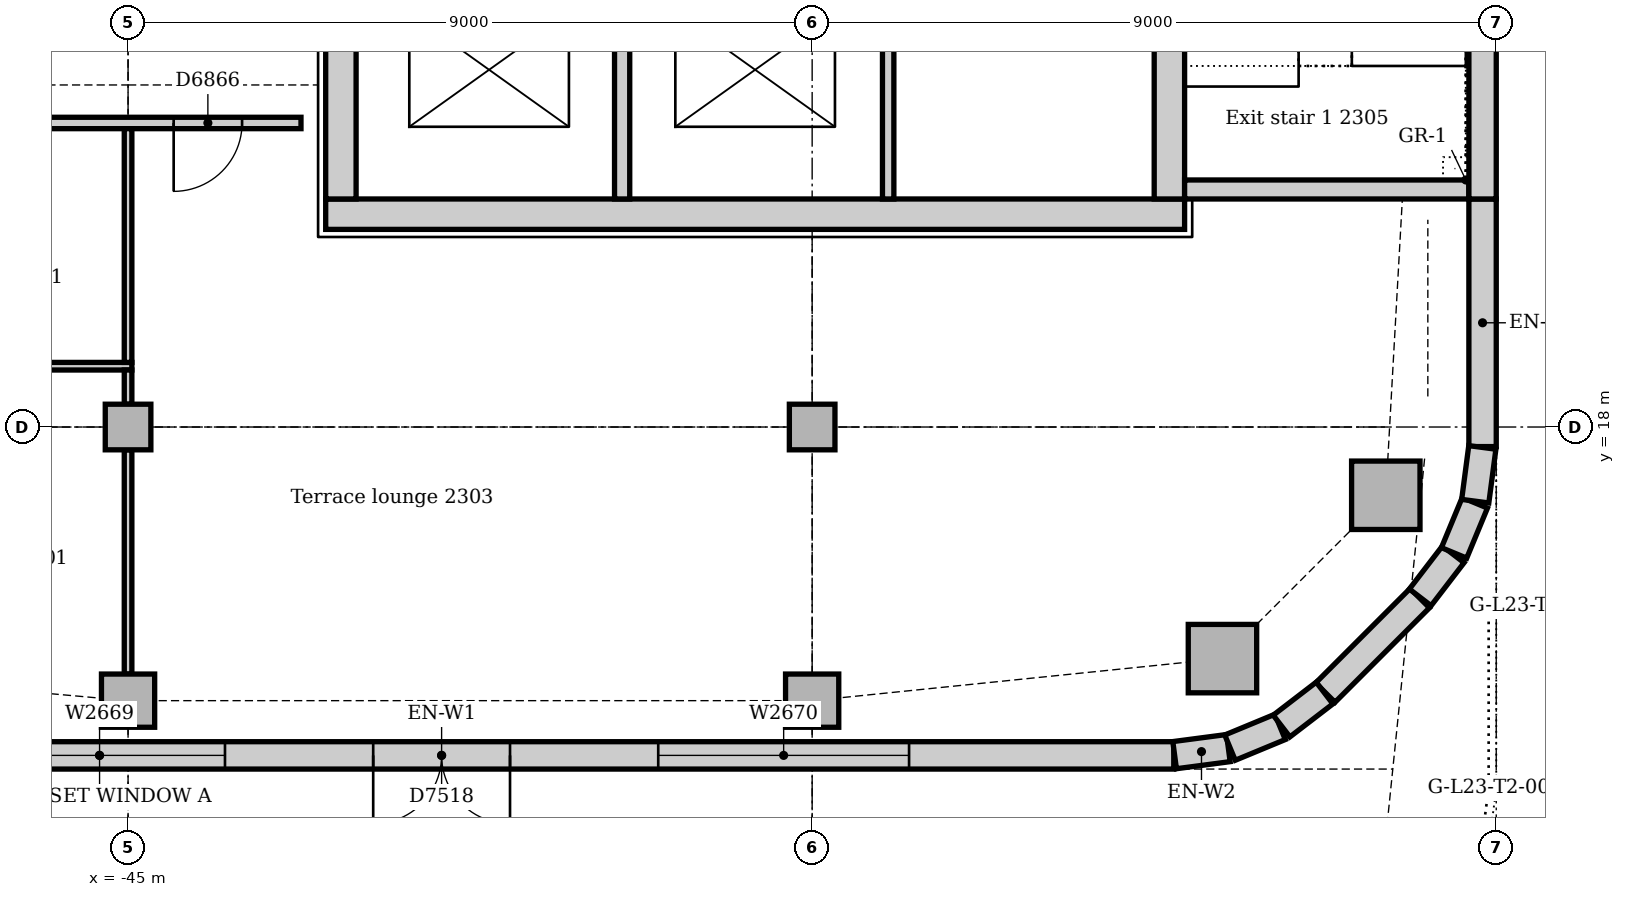
"""IFC4 building model, lengths in metres.
Left out: names, types, materials, properties, quantities, classifications, styles, units other than length and angle.
Written with IfcOpenShell. Run it as: python <this file> out.ifc"""

import sys

from ifc_helpers import new_model, si_unit, direction, frame, frame_2d, origin, origin_2d, place, context, subcontext, project, spatial, rectangle, extrude, element, fill, save


model = new_model("IFC4")
c1 = context("Model", 3, precision=1e-05, world=origin(), true_north=direction((0.0, 1.0)))
c2 = subcontext(c1, "Body", "Model", "MODEL_VIEW")
j1 = project(units=[si_unit("LENGTHUNIT", "METRE"), si_unit("PLANEANGLEUNIT", "RADIAN")], contexts=[c1])
p1 = place(None, origin())
s1 = spatial("IfcSite", under=j1, at=p1, CompositionType="ELEMENT")
p2 = place(p1, origin())
s2 = spatial("IfcBuilding", under=s1, at=p2, CompositionType="ELEMENT")
p3 = place(p2, frame((0.0, 0.0, 100.0)))
s3 = spatial("IfcBuildingStorey", under=s2, at=p3, CompositionType="ELEMENT", Elevation=100.0)
p4 = place(p3, frame((-42.4, 20.8, 0.0), z_axis=(0.0, 0.0, 1.0), x_axis=(1.0, 0.0, 0.0)))
e1 = element("IfcWall", 1, at=p4, inside=s3, PredefinedType="SOLIDWALL", context=c2, shape_type="SweptSolid", body=[
    extrude(rectangle(XDim=11.3, YDim=0.4, at=frame_2d((5.65, 0.0))), origin(), (0.0, 0.0, 1.0), 4.0),
])
p5 = place(p3, frame((-31.3, 21.0, 0.0), z_axis=(0.0, 0.0, 1.0), x_axis=(0.0, 1.0, 0.0)))
e2 = element("IfcWall", 2, at=p5, inside=s3, PredefinedType="SOLIDWALL", context=c2, shape_type="SweptSolid", body=[
    extrude(rectangle(XDim=9.5, YDim=0.4, at=frame_2d((4.75, 0.0))), origin(), (0.0, 0.0, 1.0), 4.0),
])
p6 = place(p5, frame((5.25, 0.0, 0.0)))
e3 = element("IfcOpeningElement", 3, at=p6, cuts=e2, PredefinedType="OPENING", context=c2, shape_type="SweptSolid", body=[
    extrude(rectangle(XDim=1.0, YDim=2.1, at=frame_2d((0.5, 1.05))), frame((0.0, 0.21, 0.0), z_axis=(0.0, -1.0, 0.0), x_axis=(1.0, 0.0, 0.0)), (0.0, 0.0, 1.0), 0.42),
])
p7 = place(p3, frame((-42.2, 30.5, 0.0), z_axis=(0.0, 0.0, 1.0), x_axis=(0.0, -1.0, 0.0)))
e4 = element("IfcWall", 4, at=p7, inside=s3, PredefinedType="SOLIDWALL", context=c2, shape_type="SweptSolid", body=[
    extrude(rectangle(XDim=9.5, YDim=0.4, at=frame_2d((4.75, 0.0))), origin(), (0.0, 0.0, 1.0), 4.0),
])
p8 = place(p7, frame((3.85, 0.0, 0.0)))
e5 = element("IfcOpeningElement", 5, at=p8, cuts=e4, PredefinedType="OPENING", context=c2, shape_type="SweptSolid", body=[
    extrude(rectangle(XDim=1.8, YDim=2.1, at=frame_2d((0.9, 1.05))), frame((0.0, 0.21, 0.0), z_axis=(0.0, -1.0, 0.0), x_axis=(1.0, 0.0, 0.0)), (0.0, 0.0, 1.0), 0.42),
])
p9 = place(p3, frame((-31.1, 21.125, 0.0), z_axis=(0.0, 0.0, 1.0), x_axis=(1.0, 0.0, 0.0)))
e6 = element("IfcWall", 6, at=p9, inside=s3, PredefinedType="SOLIDWALL", context=c2, shape_type="SweptSolid", body=[
    extrude(rectangle(XDim=3.74, YDim=0.25, at=frame_2d((1.87, 0.0))), origin(), (0.0, 0.0, 1.0), 4.0),
])
for number, where, z_axis, x_axis in (
    (7, (-30.602, 14.953, -0.15), (0.0, 0.0, 1.0), (1.0, 0.0, 0.0)),
    (8, (-28.453, 17.102, -0.15), (0.0, 0.0, 1.0), (1.0, 0.0, 0.0)),
):
    element("IfcColumn", number, at=place(p3, frame(where, z_axis=z_axis, x_axis=x_axis)), inside=s3, PredefinedType="COLUMN", context=c2, shape_type="SweptSolid", body=[
        extrude(rectangle(XDim=0.9, YDim=0.9, at=origin_2d()), origin(), (0.0, 0.0, 1.0), 4.0),
    ])
for number, where, z_axis, x_axis in (
    (9, (-45.0, 14.4, -0.15), (0.0, 0.0, 1.0), (1.0, 0.0, 0.0)),
    (10, (-36.0, 14.4, -0.15), (0.0, 0.0, 1.0), (1.0, 0.0, 0.0)),
):
    element("IfcColumn", number, at=place(p3, frame(where, z_axis=z_axis, x_axis=x_axis)), inside=s3, PredefinedType="COLUMN", context=c2, shape_type="SweptSolid", body=[
        extrude(rectangle(XDim=0.7, YDim=0.7, at=origin_2d()), origin(), (0.0, 0.0, 1.0), 4.0),
    ])
for number, where, z_axis, x_axis in (
    (11, (-45.0, 18.0, 0.0), (0.0, 0.0, 1.0), (1.0, 0.0, 0.0)),
    (12, (-36.0, 18.0, 0.0), (0.0, 0.0, 1.0), (1.0, 0.0, 0.0)),
):
    element("IfcColumn", number, at=place(p3, frame(where, z_axis=z_axis, x_axis=x_axis)), inside=s3, PredefinedType="COLUMN", context=c2, shape_type="SweptSolid", body=[
        extrude(rectangle(XDim=0.6, YDim=0.6, at=origin_2d()), origin(), (0.0, 0.0, 1.0), 3.85),
    ])
p10 = place(p3, frame((-50.507, 13.68, 0.0), z_axis=(0.0, 0.0, 1.0), x_axis=(1.0, 0.0, 0.0)))
e13 = element("IfcWall", 13, at=p10, inside=s3, PredefinedType="STANDARD", context=c2, shape_type="SweptSolid", body=[
    extrude(rectangle(XDim=19.265, YDim=0.36, at=frame_2d((9.632, 0.0))), origin(), (0.0, 0.0, 1.0), 3.85),
])
p11 = place(p10, frame((3.482, 0.0, 0.9)))
e14 = element("IfcOpeningElement", 14, at=p11, cuts=e13, PredefinedType="OPENING", context=c2, shape_type="SweptSolid", body=[
    extrude(rectangle(XDim=3.3, YDim=1.6, at=frame_2d((1.65, 0.8))), frame((0.0, 0.19, 0.0), z_axis=(0.0, -1.0, 0.0), x_axis=(1.0, 0.0, 0.0)), (0.0, 0.0, 1.0), 0.38),
])
p12 = place(p10, frame((8.732, 0.0, 0.0)))
e15 = element("IfcOpeningElement", 15, at=p12, cuts=e13, PredefinedType="OPENING", context=c2, shape_type="SweptSolid", body=[
    extrude(rectangle(XDim=1.8, YDim=2.4, at=frame_2d((0.9, 1.2))), frame((0.0, 0.19, 0.0), z_axis=(0.0, -1.0, 0.0), x_axis=(1.0, 0.0, 0.0)), (0.0, 0.0, 1.0), 0.38),
])
p13 = place(p10, frame((12.482, 0.0, 0.9)))
e16 = element("IfcOpeningElement", 16, at=p13, cuts=e13, PredefinedType="OPENING", context=c2, shape_type="SweptSolid", body=[
    extrude(rectangle(XDim=3.3, YDim=1.6, at=frame_2d((1.65, 0.8))), frame((0.0, 0.19, 0.0), z_axis=(0.0, -1.0, 0.0), x_axis=(1.0, 0.0, 0.0)), (0.0, 0.0, 1.0), 0.38),
])
p14 = place(p3, frame((-29.249, 14.506, 0.0), z_axis=(0.0, 0.0, 1.0), x_axis=(0.707106781187, 0.707106781187, 0.0)))
e17 = element("IfcWall", 17, at=p14, inside=s3, PredefinedType="STANDARD", context=c2, shape_type="SweptSolid", body=[
    extrude(rectangle(XDim=1.757, YDim=0.36, at=frame_2d((0.879, 0.0))), origin(), (0.0, 0.0, 1.0), 3.85),
])
p15 = place(p3, frame((-27.18, 17.743, 0.0), z_axis=(0.0, 0.0, 1.0), x_axis=(0.0, 1.0, 0.0)))
e18 = element("IfcWall", 18, at=p15, inside=s3, PredefinedType="STANDARD", context=c2, shape_type="SweptSolid", body=[
    extrude(rectangle(XDim=3.257, YDim=0.36, at=frame_2d((1.629, 0.0))), origin(), (0.0, 0.0, 1.0), 3.85),
])
p16 = place(p3, frame((-27.18, 21.0, 0.0), z_axis=(0.0, 0.0, 1.0), x_axis=(0.0, 1.0, 0.0)))
e19 = element("IfcWall", 19, at=p16, inside=s3, PredefinedType="STANDARD", context=c2, shape_type="SweptSolid", body=[
    extrude(rectangle(XDim=6.75, YDim=0.36, at=frame_2d((3.375, 0.0))), origin(), (0.0, 0.0, 1.0), 3.85),
])
for number, where, z_axis, x_axis in (
    (20, (-31.231, 13.683, 0.0), (0.0, 0.0, 1.0), (0.991, 0.131, 0.0)),
    (21, (-30.503, 13.782, 0.0), (0.0, 0.0, 1.0), (0.924, 0.383, 0.0)),
):
    element("IfcWall", number, at=place(p3, frame(where, z_axis=z_axis, x_axis=x_axis)), inside=s3, PredefinedType="STANDARD", context=c2, shape_type="SweptSolid", body=[
        extrude(rectangle(XDim=0.713, YDim=0.36, at=frame_2d((0.356, 0.0))), origin(), (0.0, 0.0, 1.0), 3.85),
    ])
for number, where, z_axis, x_axis in (
    (22, (-29.825, 14.066, 0.0), (0.0, 0.0, 1.0), (0.793, 0.609, 0.0)),
    (23, (-28.0, 15.759, 0.0), (0.0, 0.0, 1.0), (0.609, 0.793, 0.0)),
):
    element("IfcWall", number, at=place(p3, frame(where, z_axis=z_axis, x_axis=x_axis)), inside=s3, PredefinedType="STANDARD", context=c2, shape_type="SweptSolid", body=[
        extrude(rectangle(XDim=0.713, YDim=0.36, at=frame_2d((0.357, 0.0))), origin(), (0.0, 0.0, 1.0), 3.85),
    ])
for number, where, z_axis, x_axis in (
    (24, (-27.555, 16.344, 0.0), (0.0, 0.0, 1.0), (0.383, 0.924, 0.0)),
    (25, (-27.276, 17.024, 0.0), (0.0, 0.0, 1.0), (0.131, 0.991, 0.0)),
):
    element("IfcWall", number, at=place(p3, frame(where, z_axis=z_axis, x_axis=x_axis)), inside=s3, PredefinedType="STANDARD", context=c2, shape_type="SweptSolid", body=[
        extrude(rectangle(XDim=0.713, YDim=0.36, at=frame_2d((0.356, 0.0))), origin(), (0.0, 0.0, 1.0), 3.85),
    ])
p17 = place(p3, frame((-38.5, 21.0, 0.0), z_axis=(0.0, 0.0, 1.0), x_axis=(0.0, 1.0, 0.0)))
e26 = element("IfcWall", 26, at=p17, inside=s3, PredefinedType="SOLIDWALL", context=c2, shape_type="SweptSolid", body=[
    extrude(rectangle(XDim=3.1, YDim=0.2, at=frame_2d((1.55, 0.0))), origin(), (0.0, 0.0, 1.0), 4.0),
])
p18 = place(p3, frame((-35.0, 21.0, 0.0), z_axis=(0.0, 0.0, 1.0), x_axis=(0.0, 1.0, 0.0)))
e27 = element("IfcWall", 27, at=p18, inside=s3, PredefinedType="SOLIDWALL", context=c2, shape_type="SweptSolid", body=[
    extrude(rectangle(XDim=2.9, YDim=0.15, at=frame_2d((1.45, 0.0))), origin(), (0.0, 0.0, 1.0), 4.0),
])
p19 = place(p3, frame((-59.766, 22.0, 0.0), z_axis=(0.0, 0.0, 1.0), x_axis=(1.0, 0.0, 0.0)))
e28 = element("IfcWall", 28, at=p19, inside=s3, PredefinedType="PARTITIONING", context=c2, shape_type="SweptSolid", body=[
    extrude(rectangle(XDim=17.041, YDim=0.15, at=frame_2d((8.52, 0.0))), origin(), (0.0, 0.0, 1.0), 3.85),
])
p20 = place(p19, frame((15.366, 0.0, 0.0)))
e29 = element("IfcOpeningElement", 29, at=p20, cuts=e28, PredefinedType="OPENING", context=c2, shape_type="SweptSolid", body=[
    extrude(rectangle(XDim=0.9, YDim=2.1, at=frame_2d((0.45, 1.05))), frame((0.0, 0.085, 0.0), z_axis=(0.0, -1.0, 0.0), x_axis=(1.0, 0.0, 0.0)), (0.0, 0.0, 1.0), 0.17),
])
p21 = place(p19, frame((2.5, 0.0, 0.0)))
e30 = element("IfcOpeningElement", 30, at=p21, cuts=e28, PredefinedType="OPENING", context=c2, shape_type="SweptSolid", body=[
    extrude(rectangle(XDim=0.9, YDim=2.1, at=frame_2d((0.45, 1.05))), frame((0.0, 0.085, 0.0), z_axis=(0.0, -1.0, 0.0), x_axis=(1.0, 0.0, 0.0)), (0.0, 0.0, 1.0), 0.17),
])
p22 = place(p19, frame((9.056, 0.0, 0.0)))
e31 = element("IfcOpeningElement", 31, at=p22, cuts=e28, PredefinedType="OPENING", context=c2, shape_type="SweptSolid", body=[
    extrude(rectangle(XDim=1.0, YDim=2.1, at=frame_2d((0.5, 1.05))), frame((0.0, 0.085, 0.0), z_axis=(0.0, -1.0, 0.0), x_axis=(1.0, 0.0, 0.0)), (0.0, 0.0, 1.0), 0.17),
])
p23 = place(p3, frame((-54.05, 18.8, 0.0), z_axis=(0.0, 0.0, 1.0), x_axis=(1.0, 0.0, 0.0)))
e32 = element("IfcWall", 32, at=p23, inside=s3, PredefinedType="PARTITIONING", context=c2, shape_type="SweptSolid", body=[
    extrude(rectangle(XDim=9.1, YDim=0.1, at=frame_2d((4.55, 0.0))), origin(), (0.0, 0.0, 1.0), 3.85),
])
p24 = place(p23, frame((3.39, 0.0, 0.0)))
e33 = element("IfcOpeningElement", 33, at=p24, cuts=e32, PredefinedType="OPENING", context=c2, shape_type="SweptSolid", body=[
    extrude(rectangle(XDim=0.9, YDim=2.1, at=frame_2d((0.45, 1.05))), frame((0.0, 0.06, 0.0), z_axis=(0.0, -1.0, 0.0), x_axis=(1.0, 0.0, 0.0)), (0.0, 0.0, 1.0), 0.12),
])
p25 = place(p3, frame((-45.0, 18.85, 0.0), z_axis=(0.0, 0.0, 1.0), x_axis=(0.0, 1.0, 0.0)))
e34 = element("IfcWall", 34, at=p25, inside=s3, PredefinedType="PARTITIONING", context=c2, shape_type="SweptSolid", body=[
    extrude(rectangle(XDim=3.075, YDim=0.1, at=frame_2d((1.538, 0.0))), origin(), (0.0, 0.0, 1.0), 3.362),
])
p26 = place(p3, frame((-45.0, 18.3, 0.0), z_axis=(0.0, 0.0, 1.0), x_axis=(0.0, 1.0, 0.0)))
e35 = element("IfcWall", 35, at=p26, inside=s3, PredefinedType="PARTITIONING", context=c2, shape_type="SweptSolid", body=[
    extrude(rectangle(XDim=0.45, YDim=0.1, at=frame_2d((0.225, 0.0))), origin(), (0.0, 0.0, 1.0), 3.85),
])
p27 = place(p3, frame((-45.0, 14.75, 0.0), z_axis=(0.0, 0.0, 1.0), x_axis=(0.0, 1.0, 0.0)))
e36 = element("IfcWall", 36, at=p27, inside=s3, PredefinedType="PARTITIONING", context=c2, shape_type="SweptSolid", body=[
    extrude(rectangle(XDim=2.95, YDim=0.1, at=frame_2d((1.475, 0.0))), origin(), (0.0, 0.0, 1.0), 3.652),
])
p28 = place(p11, origin())
e37 = element("IfcWindow", 37, at=p28, inside=s3, PartitioningType="SINGLE_PANEL", PredefinedType="WINDOW", context=c2, shape_type="SweptSolid", body=[
    extrude(rectangle(XDim=3.3, YDim=1.6, at=frame_2d((1.65, 0.8))), frame((0.0, 0.13, 0.0), z_axis=(0.0, -1.0, 0.0), x_axis=(1.0, 0.0, 0.0)), (0.0, 0.0, 1.0), 0.06),
])
fill(e14, e37)
p29 = place(p12, frame((1.8, 0.0, 0.0), z_axis=(0.0, 0.0, 1.0), x_axis=(-1.0, 0.0, 0.0)))
e38 = element("IfcDoor", 38, at=p29, inside=s3, OperationType="DOUBLE_DOOR_SINGLE_SWING", PredefinedType="DOOR", context=c2, shape_type="SweptSolid", body=[
    extrude(rectangle(XDim=1.8, YDim=2.4, at=frame_2d((0.9, 1.2))), frame((0.0, -0.07, 0.0), z_axis=(0.0, -1.0, 0.0), x_axis=(1.0, 0.0, 0.0)), (0.0, 0.0, 1.0), 0.05),
])
fill(e15, e38)
p30 = place(p13, origin())
e39 = element("IfcWindow", 39, at=p30, inside=s3, PartitioningType="SINGLE_PANEL", PredefinedType="WINDOW", context=c2, shape_type="SweptSolid", body=[
    extrude(rectangle(XDim=3.3, YDim=1.6, at=frame_2d((1.65, 0.8))), frame((0.0, 0.13, 0.0), z_axis=(0.0, -1.0, 0.0), x_axis=(1.0, 0.0, 0.0)), (0.0, 0.0, 1.0), 0.06),
])
fill(e16, e39)
p31 = place(p20, frame((0.9, 0.0, 0.0), z_axis=(0.0, 0.0, 1.0), x_axis=(-1.0, 0.0, 0.0)))
e40 = element("IfcDoor", 40, at=p31, inside=s3, OperationType="SINGLE_SWING_RIGHT", PredefinedType="DOOR", context=c2, shape_type="SweptSolid", body=[
    extrude(rectangle(XDim=0.9, YDim=2.1, at=frame_2d((0.45, 1.05))), frame((0.0, 0.025, 0.0), z_axis=(0.0, -1.0, 0.0), x_axis=(1.0, 0.0, 0.0)), (0.0, 0.0, 1.0), 0.05),
])
fill(e29, e40)
save(model, sys.argv[1])
